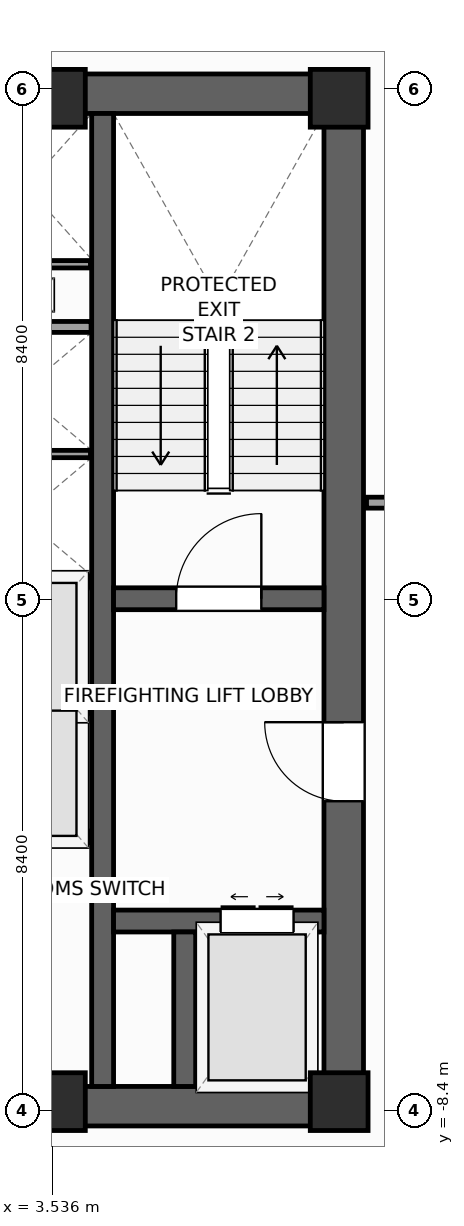
"""IFC4 building model, lengths in metres.
Left out: names, types, materials, properties, quantities, classifications, styles, units other than length and angle.
Written with IfcOpenShell. Run it as: python <this file> out.ifc"""

import sys

from ifc_helpers import new_model, si_unit, direction, frame, frame_2d, origin, origin_2d, place, context, subcontext, project, spatial, rectangle, extrude, source, transform, mapped, element, fill, save


model = new_model("IFC4")
c1 = context("Model", 3, precision=1e-05, world=origin(), true_north=direction((0.0, 1.0)))
c2 = subcontext(c1, "Body", "Model", "MODEL_VIEW")
j1 = project(units=[si_unit("LENGTHUNIT", "METRE"), si_unit("PLANEANGLEUNIT", "RADIAN")], contexts=[c1])
p1 = place(None, origin())
s1 = spatial("IfcSite", under=j1, at=p1, CompositionType="ELEMENT")
p2 = place(p1, origin())
s2 = spatial("IfcBuilding", under=s1, at=p2, CompositionType="ELEMENT")
p3 = place(p2, frame((0.0, 0.0, 180.4)))
s3 = spatial("IfcBuildingStorey", under=s2, at=p3, CompositionType="ELEMENT", Elevation=180.4)
p4 = place(p3, frame((-8.65, -8.325, 0.0), z_axis=(0.0, 0.0, 1.0), x_axis=(1.0, 0.0, 0.0)))
e1 = element("IfcWall", 1, at=p4, inside=s3, PredefinedType="SHEAR", context=c2, shape_type="SweptSolid", body=[
    extrude(rectangle(XDim=17.3, YDim=0.65, at=frame_2d((8.65, 0.0))), origin(), (0.0, 0.0, 1.0), 4.0),
])
p5 = place(p4, frame((8.0, 0.0, 0.0)))
e2 = element("IfcOpeningElement", 2, at=p5, cuts=e1, PredefinedType="OPENING", context=c2, shape_type="SweptSolid", body=[
    extrude(rectangle(XDim=1.3, YDim=2.2, at=frame_2d((0.65, 1.1))), frame((0.0, 0.335, 0.0), z_axis=(0.0, -1.0, 0.0), x_axis=(1.0, 0.0, 0.0)), (0.0, 0.0, 1.0), 0.67),
])
p6 = place(p3, frame((-8.65, 8.325, 0.0), z_axis=(0.0, 0.0, 1.0), x_axis=(1.0, 0.0, 0.0)))
e3 = element("IfcWall", 3, at=p6, inside=s3, PredefinedType="SHEAR", context=c2, shape_type="SweptSolid", body=[
    extrude(rectangle(XDim=17.3, YDim=0.65, at=frame_2d((8.65, 0.0))), origin(), (0.0, 0.0, 1.0), 4.0),
])
p7 = place(p3, frame((8.325, -8.0, 0.0), z_axis=(0.0, 0.0, 1.0), x_axis=(0.0, 1.0, 0.0)))
e4 = element("IfcWall", 4, at=p7, inside=s3, PredefinedType="SHEAR", context=c2, shape_type="SweptSolid", body=[
    extrude(rectangle(XDim=16.0, YDim=0.65, at=frame_2d((8.0, 0.0))), origin(), (0.0, 0.0, 1.0), 4.0),
])
p8 = place(p7, frame((4.69, 0.0, 0.0)))
e5 = element("IfcOpeningElement", 5, at=p8, cuts=e4, PredefinedType="OPENING", context=c2, shape_type="SweptSolid", body=[
    extrude(rectangle(XDim=1.3, YDim=2.2, at=frame_2d((0.65, 1.1))), frame((0.0, 0.335, 0.0), z_axis=(0.0, -1.0, 0.0), x_axis=(1.0, 0.0, 0.0)), (0.0, 0.0, 1.0), 0.67),
])
p9 = place(p3, frame((4.36, -8.0, 0.0), z_axis=(0.0, 0.0, 1.0), x_axis=(0.0, 1.0, 0.0)))
e6 = element("IfcWall", 6, at=p9, inside=s3, PredefinedType="SHEAR", context=c2, shape_type="SweptSolid", body=[
    extrude(rectangle(XDim=16.0, YDim=0.36, at=frame_2d((8.0, 0.0))), origin(), (0.0, 0.0, 1.0), 4.0),
])
p10 = place(p3, frame((4.54, 0.02, 0.0), z_axis=(0.0, 0.0, 1.0), x_axis=(1.0, 0.0, 0.0)))
e7 = element("IfcWall", 7, at=p10, inside=s3, PredefinedType="SHEAR", context=c2, shape_type="SweptSolid", body=[
    extrude(rectangle(XDim=3.46, YDim=0.36, at=frame_2d((1.73, 0.0))), origin(), (0.0, 0.0, 1.0), 4.0),
])
p11 = place(p10, frame((1.03, 0.0, 0.0)))
e8 = element("IfcOpeningElement", 8, at=p11, cuts=e7, PredefinedType="OPENING", context=c2, shape_type="SweptSolid", body=[
    extrude(rectangle(XDim=1.4, YDim=2.2, at=frame_2d((0.7, 1.1))), frame((0.0, 0.19, 0.0), z_axis=(0.0, -1.0, 0.0), x_axis=(1.0, 0.0, 0.0)), (0.0, 0.0, 1.0), 0.38),
])
p12 = place(p3, frame((4.54, -5.28, 0.0), z_axis=(0.0, 0.0, 1.0), x_axis=(1.0, 0.0, 0.0)))
e9 = element("IfcWall", 9, at=p12, inside=s3, PredefinedType="SHEAR", context=c2, shape_type="SweptSolid", body=[
    extrude(rectangle(XDim=3.46, YDim=0.36, at=frame_2d((1.73, 0.0))), origin(), (0.0, 0.0, 1.0), 4.0),
])
p13 = place(p12, frame((1.76, 0.0, 0.0)))
e10 = element("IfcOpeningElement", 10, at=p13, cuts=e9, PredefinedType="OPENING", context=c2, shape_type="SweptSolid", body=[
    extrude(rectangle(XDim=1.2, YDim=2.25, at=frame_2d((0.6, 1.125))), frame((0.0, 0.19, 0.0), z_axis=(0.0, -1.0, 0.0), x_axis=(1.0, 0.0, 0.0)), (0.0, 0.0, 1.0), 0.38),
])
p14 = place(p3, frame((5.71, -8.0, 0.0), z_axis=(0.0, 0.0, 1.0), x_axis=(0.0, 1.0, 0.0)))
e11 = element("IfcWall", 11, at=p14, inside=s3, PredefinedType="SHEAR", context=c2, shape_type="SweptSolid", body=[
    extrude(rectangle(XDim=2.54, YDim=0.36, at=frame_2d((1.27, 0.0))), origin(), (0.0, 0.0, 1.0), 4.0),
])
m1 = source(origin(), c2, "Body", "SweptSolid", [
    extrude(rectangle(XDim=0.95, YDim=0.95, at=origin_2d()), origin(), (0.0, 0.0, 1.0), 4.0),
])
for number, where, z_axis, x_axis in (
    (12, (8.25, -8.25, 0.0), (0.0, 0.0, 1.0), (1.0, 0.0, 0.0)),
    (13, (8.25, 8.25, 0.0), (0.0, 0.0, 1.0), (1.0, 0.0, 0.0)),
    (14, (3.6, -8.25, 0.0), (0.0, 0.0, 1.0), (1.0, 0.0, 0.0)),
    (15, (3.6, 8.25, 0.0), (0.0, 0.0, 1.0), (1.0, 0.0, 0.0)),
):
    element("IfcColumn", number, at=place(p3, frame(where, z_axis=z_axis, x_axis=x_axis)), inside=s3, PredefinedType="PILASTER", context=c2, shape_type="MappedRepresentation", body=[
        mapped(m1, transform((0.0, 0.0, 0.0), scale=1.0)),
    ])
for number, where, z_axis, x_axis in (
    (16, (1.89, -3.9, 0.0), (0.0, 0.0, 1.0), (1.0, 0.0, 0.0)),
    (17, (1.89, 0.3, 0.0), (0.0, 0.0, 1.0), (1.0, 0.0, 0.0)),
    (18, (1.89, 4.49, 0.0), (0.0, 0.0, 1.0), (1.0, 0.0, 0.0)),
):
    element("IfcWall", number, at=place(p3, frame(where, z_axis=z_axis, x_axis=x_axis)), inside=s3, PredefinedType="PARTITIONING", context=c2, shape_type="SweptSolid", body=[
        extrude(rectangle(XDim=2.28, YDim=0.18, at=frame_2d((1.14, 0.0))), origin(), (0.0, 0.0, 1.0), 3.74),
    ])
for number, where, z_axis, x_axis in (
    (19, (1.9, -1.8, 0.0), (0.0, 0.0, 1.0), (1.0, 0.0, 0.0)),
    (20, (1.9, 2.4, 0.0), (0.0, 0.0, 1.0), (1.0, 0.0, 0.0)),
):
    element("IfcWall", number, at=place(p3, frame(where, z_axis=z_axis, x_axis=x_axis)), inside=s3, PredefinedType="PARTITIONING", context=c2, shape_type="SweptSolid", body=[
        extrude(rectangle(XDim=2.26, YDim=0.12, at=frame_2d((1.13, 0.0))), origin(), (0.0, 0.0, 1.0), 3.74),
    ])
p15 = place(p3, frame((2.06, 5.52, 0.0), z_axis=(0.0, 0.0, 1.0), x_axis=(1.0, 0.0, 0.0)))
e21 = element("IfcWall", 21, at=p15, inside=s3, PredefinedType="PARTITIONING", context=c2, shape_type="SweptSolid", body=[
    extrude(rectangle(XDim=2.1, YDim=0.12, at=frame_2d((1.05, 0.0))), origin(), (0.0, 0.0, 1.0), 3.74),
])
p16 = place(p3, frame((8.7, 1.6, 0.0), z_axis=(0.0, 0.0, 1.0), x_axis=(1.0, 0.0, 0.0)))
e22 = element("IfcWall", 22, at=p16, inside=s3, PredefinedType="PARTITIONING", context=c2, shape_type="SweptSolid", body=[
    extrude(rectangle(XDim=2.85, YDim=0.18, at=frame_2d((1.425, 0.0))), origin(), (0.0, 0.0, 1.0), 3.74),
])
p17 = place(p16, frame((0.875, 0.0, 0.0)))
e23 = element("IfcOpeningElement", 23, at=p17, cuts=e22, PredefinedType="OPENING", context=c2, shape_type="SweptSolid", body=[
    extrude(rectangle(XDim=1.1, YDim=2.2, at=frame_2d((0.55, 1.1))), frame((0.0, 0.1, 0.0), z_axis=(0.0, -1.0, 0.0), x_axis=(1.0, 0.0, 0.0)), (0.0, 0.0, 1.0), 0.2),
])
m2 = source(origin(), c2, "Body", "SweptSolid", [
    extrude(rectangle(XDim=1.4, YDim=2.2, at=frame_2d((0.7, 1.1))), frame((0.0, 0.025, 0.0), z_axis=(0.0, -1.0, 0.0), x_axis=(1.0, 0.0, 0.0)), (0.0, 0.0, 1.0), 0.05),
])
p18 = place(p11, origin())
e24 = element("IfcDoor", 24, at=p18, inside=s3, OperationType="SINGLE_SWING_RIGHT", PredefinedType="DOOR", context=c2, shape_type="MappedRepresentation", body=[
    mapped(m2, transform((0.0, 0.0, 0.0), scale=1.0)),
])
fill(e8, e24)
m3 = source(origin(), c2, "Body", "SweptSolid", [
    extrude(rectangle(XDim=1.3, YDim=2.2, at=frame_2d((0.65, 1.1))), frame((0.0, 0.025, 0.0), z_axis=(0.0, -1.0, 0.0), x_axis=(1.0, 0.0, 0.0)), (0.0, 0.0, 1.0), 0.05),
])
p19 = place(p8, origin())
e25 = element("IfcDoor", 25, at=p19, inside=s3, OperationType="SINGLE_SWING_RIGHT", PredefinedType="DOOR", context=c2, shape_type="MappedRepresentation", body=[
    mapped(m3, transform((0.0, 0.0, 0.0), scale=1.0)),
])
fill(e5, e25)
m4 = source(origin(), c2, "Body", "SweptSolid", [
    extrude(rectangle(XDim=1.2, YDim=2.25, at=frame_2d((0.6, 1.125))), frame((0.0, 0.025, 0.0), z_axis=(0.0, -1.0, 0.0), x_axis=(1.0, 0.0, 0.0)), (0.0, 0.0, 1.0), 0.05),
])
p20 = place(p13, origin())
e26 = element("IfcDoor", 26, at=p20, inside=s3, OperationType="DOUBLE_DOOR_SLIDING", PredefinedType="DOOR", context=c2, shape_type="MappedRepresentation", body=[
    mapped(m4, transform((0.0, 0.0, 0.0), scale=1.0)),
])
fill(e10, e26)
save(model, sys.argv[1])
